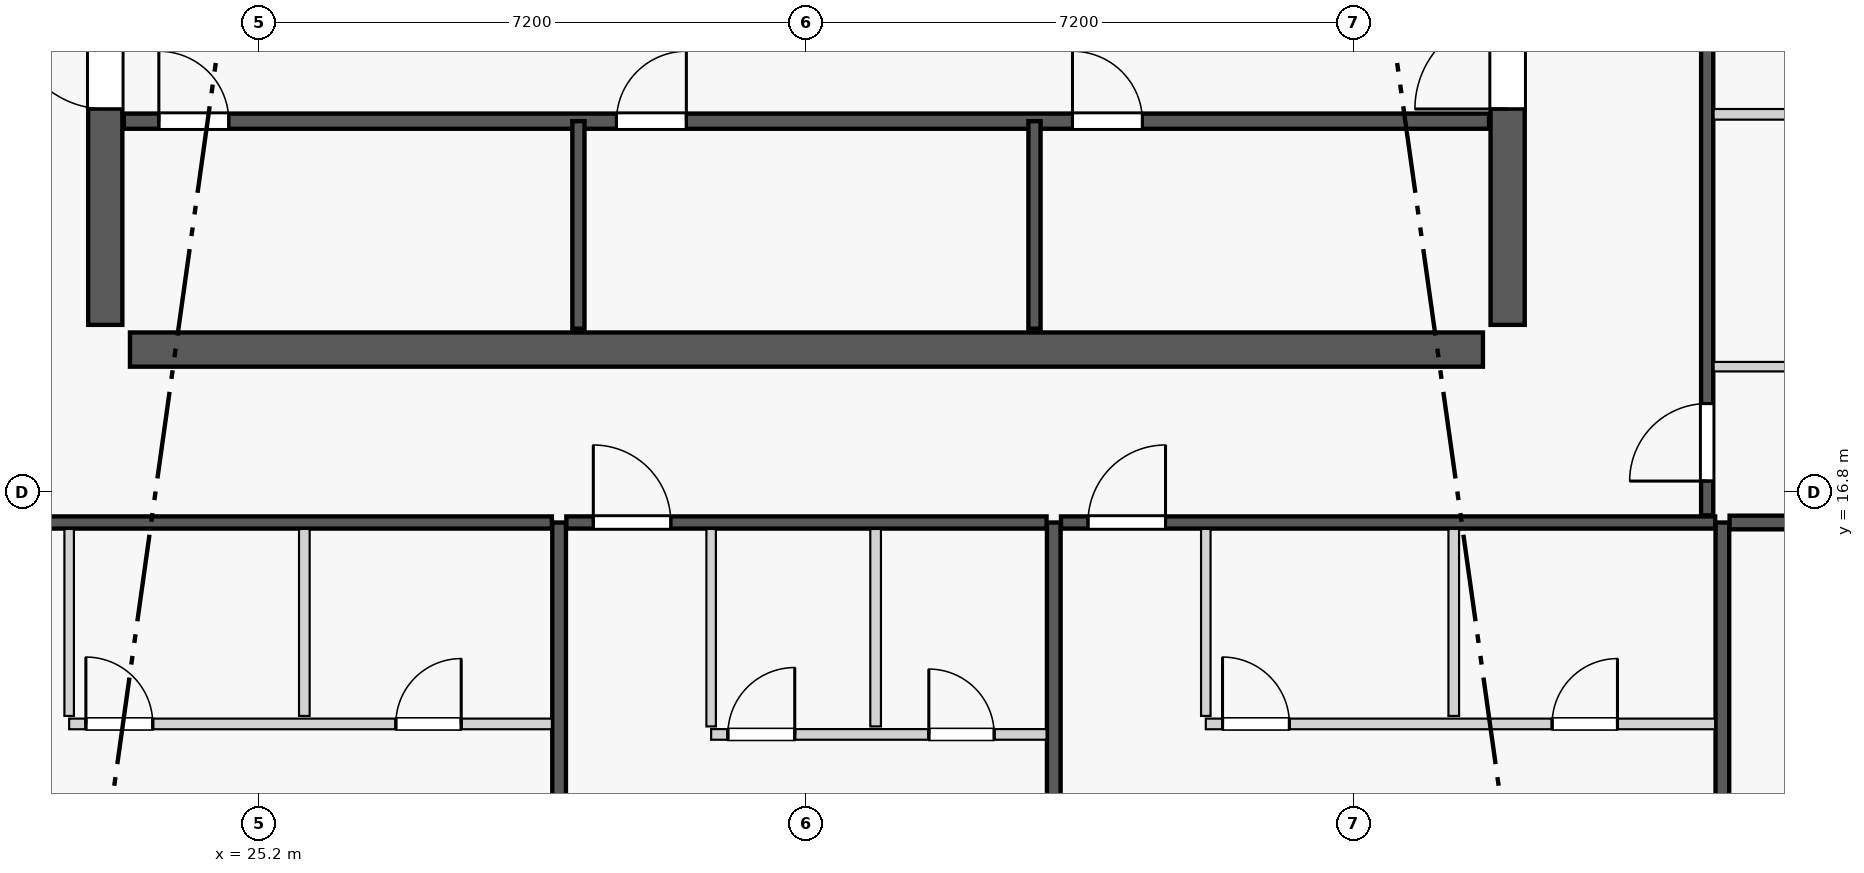
"""IFC4 building model, lengths in metres.
Left out: names, types, materials, properties, quantities, classifications, styles, units other than length and angle.
Written with IfcOpenShell. Run it as: python <this file> out.ifc"""

import sys

from ifc_helpers import new_model, si_unit, direction, frame, frame_2d, origin, origin_2d, place, context, subcontext, project, spatial, rectangle, extrude, element, fill, save


model = new_model("IFC4")
c1 = context("Model", 3, precision=1e-05, world=origin(), true_north=direction((0.0, 1.0)))
c2 = subcontext(c1, "Body", "Model", "MODEL_VIEW")
j1 = project(units=[si_unit("LENGTHUNIT", "METRE"), si_unit("PLANEANGLEUNIT", "RADIAN")], contexts=[c1])
p1 = place(None, origin())
s1 = spatial("IfcSite", under=j1, at=p1, CompositionType="ELEMENT")
p2 = place(p1, origin())
s2 = spatial("IfcBuilding", under=s1, at=p2, CompositionType="ELEMENT")
p3 = place(p2, frame((0.0, 0.0, 241.6)))
s3 = spatial("IfcBuildingStorey", under=s2, at=p3, CompositionType="ELEMENT", Elevation=241.6)
for number, where, z_axis, x_axis in (
    (1, (23.175, 18.675, 0.0), (0.0, 0.0, 1.0), (1.0, 0.0, 0.0)),
    (2, (41.625, 18.675, 0.0), (0.0, 0.0, 1.0), (1.0, 0.0, 0.0)),
):
    element("IfcColumn", number, at=place(p3, frame(where, z_axis=z_axis, x_axis=x_axis)), inside=s3, PredefinedType="COLUMN", context=c2, shape_type="SweptSolid", body=[
        extrude(rectangle(XDim=0.65, YDim=0.65, at=origin_2d()), origin(), (0.0, 0.0, 1.0), 3.65),
    ])
p4 = place(p3, frame((23.5, 18.675, 0.0), z_axis=(0.0, 0.0, 1.0), x_axis=(1.0, 0.0, 0.0)))
e3 = element("IfcWall", 3, at=p4, inside=s3, PredefinedType="SHEAR", context=c2, shape_type="SweptSolid", body=[
    extrude(rectangle(XDim=17.8, YDim=0.45, at=frame_2d((8.9, 0.0))), origin(), (0.0, 0.0, 1.0), 3.45),
])
p5 = place(p3, frame((23.175, 19.0, 0.0), z_axis=(0.0, 0.0, 1.0), x_axis=(0.0, 1.0, 0.0)))
e4 = element("IfcWall", 4, at=p5, inside=s3, PredefinedType="SHEAR", context=c2, shape_type="SweptSolid", body=[
    extrude(rectangle(XDim=13.8, YDim=0.45, at=frame_2d((6.9, 0.0))), origin(), (0.0, 0.0, 1.0), 3.45),
])
p6 = place(p5, frame((2.84, 0.0, 0.0)))
e5 = element("IfcOpeningElement", 5, at=p6, cuts=e4, PredefinedType="OPENING", context=c2, shape_type="SweptSolid", body=[
    extrude(rectangle(XDim=1.22, YDim=2.25, at=frame_2d((0.61, 1.125))), frame((0.0, 0.235, 0.0), z_axis=(0.0, -1.0, 0.0), x_axis=(1.0, 0.0, 0.0)), (0.0, 0.0, 1.0), 0.47),
])
p7 = place(p3, frame((41.625, 19.0, 0.0), z_axis=(0.0, 0.0, 1.0), x_axis=(0.0, 1.0, 0.0)))
e6 = element("IfcWall", 6, at=p7, inside=s3, PredefinedType="SHEAR", context=c2, shape_type="SweptSolid", body=[
    extrude(rectangle(XDim=13.8, YDim=0.45, at=frame_2d((6.9, 0.0))), origin(), (0.0, 0.0, 1.0), 3.45),
])
p8 = place(p7, frame((2.84, 0.0, 0.0)))
e7 = element("IfcOpeningElement", 7, at=p8, cuts=e6, PredefinedType="OPENING", context=c2, shape_type="SweptSolid", body=[
    extrude(rectangle(XDim=1.22, YDim=2.25, at=frame_2d((0.61, 1.125))), frame((0.0, 0.235, 0.0), z_axis=(0.0, -1.0, 0.0), x_axis=(1.0, 0.0, 0.0)), (0.0, 0.0, 1.0), 0.47),
])
p9 = place(p3, frame((23.42, 21.68, 0.0), z_axis=(0.0, 0.0, 1.0), x_axis=(1.0, 0.0, 0.0)))
e8 = element("IfcWall", 8, at=p9, inside=s3, PredefinedType="PLUMBINGWALL", context=c2, shape_type="SweptSolid", body=[
    extrude(rectangle(XDim=17.96, YDim=0.2, at=frame_2d((8.98, 0.0))), origin(), (0.0, 0.0, 1.0), 3.45),
])
p10 = place(p9, frame((0.46, 0.0, 0.0)))
e9 = element("IfcOpeningElement", 9, at=p10, cuts=e8, PredefinedType="OPENING", context=c2, shape_type="SweptSolid", body=[
    extrude(rectangle(XDim=0.92, YDim=2.15, at=frame_2d((0.46, 1.075))), frame((0.0, 0.11, 0.0), z_axis=(0.0, -1.0, 0.0), x_axis=(1.0, 0.0, 0.0)), (0.0, 0.0, 1.0), 0.22),
])
p11 = place(p9, frame((6.48, 0.0, 0.0)))
e10 = element("IfcOpeningElement", 10, at=p11, cuts=e8, PredefinedType="OPENING", context=c2, shape_type="SweptSolid", body=[
    extrude(rectangle(XDim=0.92, YDim=2.15, at=frame_2d((0.46, 1.075))), frame((0.0, 0.11, 0.0), z_axis=(0.0, -1.0, 0.0), x_axis=(1.0, 0.0, 0.0)), (0.0, 0.0, 1.0), 0.22),
])
p12 = place(p9, frame((12.48, 0.0, 0.0)))
e11 = element("IfcOpeningElement", 11, at=p12, cuts=e8, PredefinedType="OPENING", context=c2, shape_type="SweptSolid", body=[
    extrude(rectangle(XDim=0.92, YDim=2.15, at=frame_2d((0.46, 1.075))), frame((0.0, 0.11, 0.0), z_axis=(0.0, -1.0, 0.0), x_axis=(1.0, 0.0, 0.0)), (0.0, 0.0, 1.0), 0.22),
])
for number, where, z_axis, x_axis in (
    (12, (29.4, 18.95, 0.0), (0.0, 0.0, 1.0), (0.0, 1.0, 0.0)),
    (13, (35.4, 18.95, 0.0), (0.0, 0.0, 1.0), (0.0, 1.0, 0.0)),
):
    element("IfcWall", number, at=place(p3, frame(where, z_axis=z_axis, x_axis=x_axis)), inside=s3, PredefinedType="PARTITIONING", context=c2, shape_type="SweptSolid", body=[
        extrude(rectangle(XDim=2.73, YDim=0.16, at=frame_2d((1.365, 0.0))), origin(), (0.0, 0.0, 1.0), 3.45),
    ])
for number, where, z_axis, x_axis in (
    (14, (29.146, 7.405, 0.0), (0.0, 0.0, 1.0), (0.0, 1.0, 0.0)),
    (15, (35.654, 7.405, 0.0), (0.0, 0.0, 1.0), (0.0, 1.0, 0.0)),
):
    element("IfcWall", number, at=place(p3, frame(where, z_axis=z_axis, x_axis=x_axis)), inside=s3, PredefinedType="PARTITIONING", context=c2, shape_type="SweptSolid", body=[
        extrude(rectangle(XDim=8.995, YDim=0.18, at=frame_2d((4.498, 0.0))), origin(), (0.0, 0.0, 1.0), 2.907),
    ])
p13 = place(p3, frame((44.45, 8.119, 0.0), z_axis=(0.0, 0.0, 1.0), x_axis=(0.0, 1.0, 0.0)))
e16 = element("IfcWall", 16, at=p13, inside=s3, PredefinedType="PARTITIONING", context=c2, shape_type="SweptSolid", body=[
    extrude(rectangle(XDim=8.281, YDim=0.18, at=frame_2d((4.141, 0.0))), origin(), (0.0, 0.0, 1.0), 3.45),
])
p14 = place(p3, frame((20.445, 16.4, 0.0), z_axis=(0.0, 0.0, 1.0), x_axis=(1.0, 0.0, 0.0)))
e17 = element("IfcWall", 17, at=p14, inside=s3, PredefinedType="PARTITIONING", context=c2, shape_type="SweptSolid", body=[
    extrude(rectangle(XDim=8.606, YDim=0.16, at=frame_2d((4.303, 0.0))), origin(), (0.0, 0.0, 1.0), 3.45),
])
p15 = place(p14, frame((0.705, 0.0, 0.0)))
e18 = element("IfcOpeningElement", 18, at=p15, cuts=e17, PredefinedType="OPENING", context=c2, shape_type="SweptSolid", body=[
    extrude(rectangle(XDim=1.02, YDim=2.25, at=frame_2d((0.51, 1.125))), frame((0.0, 0.09, 0.0), z_axis=(0.0, -1.0, 0.0), x_axis=(1.0, 0.0, 0.0)), (0.0, 0.0, 1.0), 0.18),
])
p16 = place(p3, frame((22.7, 13.855, 0.0), z_axis=(0.0, 0.0, 1.0), x_axis=(0.0, 1.0, 0.0)))
e19 = element("IfcWall", 19, at=p16, inside=s3, PredefinedType="PARTITIONING", context=c2, shape_type="SweptSolid", body=[
    extrude(rectangle(XDim=2.46, YDim=0.125, at=frame_2d((1.23, 0.0))), origin(), (0.0, 0.0, 1.0), 2.907),
])
p17 = place(p3, frame((22.7, 13.75, 0.0), z_axis=(0.0, 0.0, 1.0), x_axis=(1.0, 0.0, 0.0)))
e20 = element("IfcWall", 20, at=p17, inside=s3, PredefinedType="PLUMBINGWALL", context=c2, shape_type="SweptSolid", body=[
    extrude(rectangle(XDim=6.351, YDim=0.14, at=frame_2d((3.176, 0.0))), origin(), (0.0, 0.0, 1.0), 3.45),
])
p18 = place(p17, frame((4.298, 0.0, 0.0)))
e21 = element("IfcOpeningElement", 21, at=p18, cuts=e20, PredefinedType="OPENING", context=c2, shape_type="SweptSolid", body=[
    extrude(rectangle(XDim=0.86, YDim=2.1, at=frame_2d((0.43, 1.05))), frame((0.0, 0.08, 0.0), z_axis=(0.0, -1.0, 0.0), x_axis=(1.0, 0.0, 0.0)), (0.0, 0.0, 1.0), 0.16),
])
p19 = place(p17, frame((0.22, 0.0, 0.0)))
e22 = element("IfcOpeningElement", 22, at=p19, cuts=e20, PredefinedType="OPENING", context=c2, shape_type="SweptSolid", body=[
    extrude(rectangle(XDim=0.88, YDim=2.15, at=frame_2d((0.44, 1.075))), frame((0.0, 0.08, 0.0), z_axis=(0.0, -1.0, 0.0), x_axis=(1.0, 0.0, 0.0)), (0.0, 0.0, 1.0), 0.16),
])
p20 = place(p3, frame((25.794, 13.855, 0.0), z_axis=(0.0, 0.0, 1.0), x_axis=(0.0, 1.0, 0.0)))
e23 = element("IfcWall", 23, at=p20, inside=s3, PredefinedType="PLUMBINGWALL", context=c2, shape_type="SweptSolid", body=[
    extrude(rectangle(XDim=2.46, YDim=0.14, at=frame_2d((1.23, 0.0))), origin(), (0.0, 0.0, 1.0), 3.45),
])
p21 = place(p3, frame((29.241, 16.4, 0.0), z_axis=(0.0, 0.0, 1.0), x_axis=(1.0, 0.0, 0.0)))
e24 = element("IfcWall", 24, at=p21, inside=s3, PredefinedType="PARTITIONING", context=c2, shape_type="SweptSolid", body=[
    extrude(rectangle(XDim=6.318, YDim=0.16, at=frame_2d((3.159, 0.0))), origin(), (0.0, 0.0, 1.0), 3.45),
])
p22 = place(p21, frame((0.355, 0.0, 0.0)))
e25 = element("IfcOpeningElement", 25, at=p22, cuts=e24, PredefinedType="OPENING", context=c2, shape_type="SweptSolid", body=[
    extrude(rectangle(XDim=1.02, YDim=2.25, at=frame_2d((0.51, 1.125))), frame((0.0, 0.09, 0.0), z_axis=(0.0, -1.0, 0.0), x_axis=(1.0, 0.0, 0.0)), (0.0, 0.0, 1.0), 0.18),
])
p23 = place(p3, frame((31.146, 13.717, 0.0), z_axis=(0.0, 0.0, 1.0), x_axis=(0.0, 1.0, 0.0)))
e26 = element("IfcWall", 26, at=p23, inside=s3, PredefinedType="PARTITIONING", context=c2, shape_type="SweptSolid", body=[
    extrude(rectangle(XDim=2.598, YDim=0.125, at=frame_2d((1.299, 0.0))), origin(), (0.0, 0.0, 1.0), 3.45),
])
p24 = place(p3, frame((31.146, 13.612, 0.0), z_axis=(0.0, 0.0, 1.0), x_axis=(1.0, 0.0, 0.0)))
e27 = element("IfcWall", 27, at=p24, inside=s3, PredefinedType="PLUMBINGWALL", context=c2, shape_type="SweptSolid", body=[
    extrude(rectangle(XDim=4.413, YDim=0.14, at=frame_2d((2.207, 0.0))), origin(), (0.0, 0.0, 1.0), 3.45),
])
p25 = place(p24, frame((2.864, 0.0, 0.0)))
e28 = element("IfcOpeningElement", 28, at=p25, cuts=e27, PredefinedType="OPENING", context=c2, shape_type="SweptSolid", body=[
    extrude(rectangle(XDim=0.86, YDim=2.1, at=frame_2d((0.43, 1.05))), frame((0.0, 0.08, 0.0), z_axis=(0.0, -1.0, 0.0), x_axis=(1.0, 0.0, 0.0)), (0.0, 0.0, 1.0), 0.16),
])
p26 = place(p24, frame((0.22, 0.0, 0.0)))
e29 = element("IfcOpeningElement", 29, at=p26, cuts=e27, PredefinedType="OPENING", context=c2, shape_type="SweptSolid", body=[
    extrude(rectangle(XDim=0.88, YDim=2.15, at=frame_2d((0.44, 1.075))), frame((0.0, 0.08, 0.0), z_axis=(0.0, -1.0, 0.0), x_axis=(1.0, 0.0, 0.0)), (0.0, 0.0, 1.0), 0.16),
])
p27 = place(p3, frame((33.31, 13.717, 0.0), z_axis=(0.0, 0.0, 1.0), x_axis=(0.0, 1.0, 0.0)))
e30 = element("IfcWall", 30, at=p27, inside=s3, PredefinedType="PLUMBINGWALL", context=c2, shape_type="SweptSolid", body=[
    extrude(rectangle(XDim=2.598, YDim=0.14, at=frame_2d((1.299, 0.0))), origin(), (0.0, 0.0, 1.0), 3.45),
])
p28 = place(p3, frame((35.749, 16.4, 0.0), z_axis=(0.0, 0.0, 1.0), x_axis=(1.0, 0.0, 0.0)))
e31 = element("IfcWall", 31, at=p28, inside=s3, PredefinedType="PARTITIONING", context=c2, shape_type="SweptSolid", body=[
    extrude(rectangle(XDim=8.606, YDim=0.16, at=frame_2d((4.303, 0.0))), origin(), (0.0, 0.0, 1.0), 3.45),
])
p29 = place(p28, frame((0.355, 0.0, 0.0)))
e32 = element("IfcOpeningElement", 32, at=p29, cuts=e31, PredefinedType="OPENING", context=c2, shape_type="SweptSolid", body=[
    extrude(rectangle(XDim=1.02, YDim=2.25, at=frame_2d((0.51, 1.125))), frame((0.0, 0.09, 0.0), z_axis=(0.0, -1.0, 0.0), x_axis=(1.0, 0.0, 0.0)), (0.0, 0.0, 1.0), 0.18),
])
p30 = place(p3, frame((37.654, 13.855, 0.0), z_axis=(0.0, 0.0, 1.0), x_axis=(0.0, 1.0, 0.0)))
e33 = element("IfcWall", 33, at=p30, inside=s3, PredefinedType="PARTITIONING", context=c2, shape_type="SweptSolid", body=[
    extrude(rectangle(XDim=2.46, YDim=0.125, at=frame_2d((1.23, 0.0))), origin(), (0.0, 0.0, 1.0), 3.45),
])
p31 = place(p3, frame((37.654, 13.75, 0.0), z_axis=(0.0, 0.0, 1.0), x_axis=(1.0, 0.0, 0.0)))
e34 = element("IfcWall", 34, at=p31, inside=s3, PredefinedType="PLUMBINGWALL", context=c2, shape_type="SweptSolid", body=[
    extrude(rectangle(XDim=6.701, YDim=0.14, at=frame_2d((3.351, 0.0))), origin(), (0.0, 0.0, 1.0), 3.45),
])
p32 = place(p31, frame((4.556, 0.0, 0.0)))
e35 = element("IfcOpeningElement", 35, at=p32, cuts=e34, PredefinedType="OPENING", context=c2, shape_type="SweptSolid", body=[
    extrude(rectangle(XDim=0.86, YDim=2.1, at=frame_2d((0.43, 1.05))), frame((0.0, 0.08, 0.0), z_axis=(0.0, -1.0, 0.0), x_axis=(1.0, 0.0, 0.0)), (0.0, 0.0, 1.0), 0.16),
])
p33 = place(p31, frame((0.22, 0.0, 0.0)))
e36 = element("IfcOpeningElement", 36, at=p33, cuts=e34, PredefinedType="OPENING", context=c2, shape_type="SweptSolid", body=[
    extrude(rectangle(XDim=0.88, YDim=2.15, at=frame_2d((0.44, 1.075))), frame((0.0, 0.08, 0.0), z_axis=(0.0, -1.0, 0.0), x_axis=(1.0, 0.0, 0.0)), (0.0, 0.0, 1.0), 0.16),
])
p34 = place(p3, frame((40.916, 13.855, 0.0), z_axis=(0.0, 0.0, 1.0), x_axis=(0.0, 1.0, 0.0)))
e37 = element("IfcWall", 37, at=p34, inside=s3, PredefinedType="PLUMBINGWALL", context=c2, shape_type="SweptSolid", body=[
    extrude(rectangle(XDim=2.46, YDim=0.14, at=frame_2d((1.23, 0.0))), origin(), (0.0, 0.0, 1.0), 3.45),
])
p35 = place(p3, frame((44.545, 16.4, 0.0), z_axis=(0.0, 0.0, 1.0), x_axis=(1.0, 0.0, 0.0)))
e38 = element("IfcWall", 38, at=p35, inside=s3, PredefinedType="PARTITIONING", context=c2, shape_type="SweptSolid", body=[
    extrude(rectangle(XDim=4.221, YDim=0.18, at=frame_2d((2.111, 0.0))), origin(), (0.0, 0.0, 1.0), 3.45),
])
p36 = place(p3, frame((44.25, 16.495, 0.0), z_axis=(0.0, 0.0, 1.0), x_axis=(0.0, 1.0, 0.0)))
e39 = element("IfcWall", 39, at=p36, inside=s3, PredefinedType="PARTITIONING", context=c2, shape_type="SweptSolid", body=[
    extrude(rectangle(XDim=18.41, YDim=0.16, at=frame_2d((9.205, 0.0))), origin(), (0.0, 0.0, 1.0), 3.137),
])
p37 = place(p36, frame((0.45, 0.0, 0.0)))
e40 = element("IfcOpeningElement", 40, at=p37, cuts=e39, PredefinedType="OPENING", context=c2, shape_type="SweptSolid", body=[
    extrude(rectangle(XDim=1.02, YDim=2.25, at=frame_2d((0.51, 1.125))), frame((0.0, 0.09, 0.0), z_axis=(0.0, -1.0, 0.0), x_axis=(1.0, 0.0, 0.0)), (0.0, 0.0, 1.0), 0.18),
])
p38 = place(p3, frame((44.335, 18.45, 0.0), z_axis=(0.0, 0.0, 1.0), x_axis=(1.0, 0.0, 0.0)))
e41 = element("IfcWall", 41, at=p38, inside=s3, PredefinedType="PARTITIONING", context=c2, shape_type="SweptSolid", body=[
    extrude(rectangle(XDim=3.78, YDim=0.125, at=frame_2d((1.89, 0.0))), origin(), (0.0, 0.0, 1.0), 3.45),
])
p39 = place(p3, frame((44.335, 21.77, 0.0), z_axis=(0.0, 0.0, 1.0), x_axis=(1.0, 0.0, 0.0)))
e42 = element("IfcWall", 42, at=p39, inside=s3, PredefinedType="PLUMBINGWALL", context=c2, shape_type="SweptSolid", body=[
    extrude(rectangle(XDim=3.78, YDim=0.14, at=frame_2d((1.89, 0.0))), origin(), (0.0, 0.0, 1.0), 3.45),
])
p40 = place(p6, origin())
e43 = element("IfcDoor", 43, at=p40, inside=s3, OperationType="SINGLE_SWING_RIGHT", PredefinedType="DOOR", context=c2, shape_type="SweptSolid", body=[
    extrude(rectangle(XDim=1.22, YDim=2.25, at=frame_2d((0.61, 1.125))), frame((0.0, 0.025, 0.0), z_axis=(0.0, -1.0, 0.0), x_axis=(1.0, 0.0, 0.0)), (0.0, 0.0, 1.0), 0.05),
])
fill(e5, e43)
p41 = place(p8, origin())
e44 = element("IfcDoor", 44, at=p41, inside=s3, OperationType="SINGLE_SWING_LEFT", PredefinedType="DOOR", context=c2, shape_type="SweptSolid", body=[
    extrude(rectangle(XDim=1.22, YDim=2.25, at=frame_2d((0.61, 1.125))), frame((0.0, 0.025, 0.0), z_axis=(0.0, -1.0, 0.0), x_axis=(1.0, 0.0, 0.0)), (0.0, 0.0, 1.0), 0.05),
])
fill(e7, e44)
p42 = place(p10, origin())
e45 = element("IfcDoor", 45, at=p42, inside=s3, OperationType="SINGLE_SWING_LEFT", PredefinedType="DOOR", context=c2, shape_type="SweptSolid", body=[
    extrude(rectangle(XDim=0.92, YDim=2.15, at=frame_2d((0.46, 1.075))), frame((0.0, 0.025, 0.0), z_axis=(0.0, -1.0, 0.0), x_axis=(1.0, 0.0, 0.0)), (0.0, 0.0, 1.0), 0.05),
])
fill(e9, e45)
p43 = place(p11, origin())
e46 = element("IfcDoor", 46, at=p43, inside=s3, OperationType="SINGLE_SWING_RIGHT", PredefinedType="DOOR", context=c2, shape_type="SweptSolid", body=[
    extrude(rectangle(XDim=0.92, YDim=2.15, at=frame_2d((0.46, 1.075))), frame((0.0, 0.025, 0.0), z_axis=(0.0, -1.0, 0.0), x_axis=(1.0, 0.0, 0.0)), (0.0, 0.0, 1.0), 0.05),
])
fill(e10, e46)
p44 = place(p12, origin())
e47 = element("IfcDoor", 47, at=p44, inside=s3, OperationType="SINGLE_SWING_LEFT", PredefinedType="DOOR", context=c2, shape_type="SweptSolid", body=[
    extrude(rectangle(XDim=0.92, YDim=2.15, at=frame_2d((0.46, 1.075))), frame((0.0, 0.025, 0.0), z_axis=(0.0, -1.0, 0.0), x_axis=(1.0, 0.0, 0.0)), (0.0, 0.0, 1.0), 0.05),
])
fill(e11, e47)
p45 = place(p18, origin())
e48 = element("IfcDoor", 48, at=p45, inside=s3, OperationType="SINGLE_SWING_RIGHT", PredefinedType="DOOR", context=c2, shape_type="SweptSolid", body=[
    extrude(rectangle(XDim=0.86, YDim=2.1, at=frame_2d((0.43, 1.05))), frame((0.0, 0.025, 0.0), z_axis=(0.0, -1.0, 0.0), x_axis=(1.0, 0.0, 0.0)), (0.0, 0.0, 1.0), 0.05),
])
fill(e21, e48)
p46 = place(p19, origin())
e49 = element("IfcDoor", 49, at=p46, inside=s3, OperationType="SINGLE_SWING_LEFT", PredefinedType="DOOR", context=c2, shape_type="SweptSolid", body=[
    extrude(rectangle(XDim=0.88, YDim=2.15, at=frame_2d((0.44, 1.075))), frame((0.0, 0.025, 0.0), z_axis=(0.0, -1.0, 0.0), x_axis=(1.0, 0.0, 0.0)), (0.0, 0.0, 1.0), 0.05),
])
fill(e22, e49)
p47 = place(p25, origin())
e50 = element("IfcDoor", 50, at=p47, inside=s3, OperationType="SINGLE_SWING_LEFT", PredefinedType="DOOR", context=c2, shape_type="SweptSolid", body=[
    extrude(rectangle(XDim=0.86, YDim=2.1, at=frame_2d((0.43, 1.05))), frame((0.0, 0.025, 0.0), z_axis=(0.0, -1.0, 0.0), x_axis=(1.0, 0.0, 0.0)), (0.0, 0.0, 1.0), 0.05),
])
fill(e28, e50)
p48 = place(p22, origin())
e51 = element("IfcDoor", 51, at=p48, inside=s3, OperationType="SINGLE_SWING_LEFT", PredefinedType="DOOR", context=c2, shape_type="SweptSolid", body=[
    extrude(rectangle(XDim=1.02, YDim=2.25, at=frame_2d((0.51, 1.125))), frame((0.0, 0.025, 0.0), z_axis=(0.0, -1.0, 0.0), x_axis=(1.0, 0.0, 0.0)), (0.0, 0.0, 1.0), 0.05),
])
fill(e25, e51)
p49 = place(p26, origin())
e52 = element("IfcDoor", 52, at=p49, inside=s3, OperationType="SINGLE_SWING_RIGHT", PredefinedType="DOOR", context=c2, shape_type="SweptSolid", body=[
    extrude(rectangle(XDim=0.88, YDim=2.15, at=frame_2d((0.44, 1.075))), frame((0.0, 0.025, 0.0), z_axis=(0.0, -1.0, 0.0), x_axis=(1.0, 0.0, 0.0)), (0.0, 0.0, 1.0), 0.05),
])
fill(e29, e52)
p50 = place(p32, origin())
e53 = element("IfcDoor", 53, at=p50, inside=s3, OperationType="SINGLE_SWING_RIGHT", PredefinedType="DOOR", context=c2, shape_type="SweptSolid", body=[
    extrude(rectangle(XDim=0.86, YDim=2.1, at=frame_2d((0.43, 1.05))), frame((0.0, 0.025, 0.0), z_axis=(0.0, -1.0, 0.0), x_axis=(1.0, 0.0, 0.0)), (0.0, 0.0, 1.0), 0.05),
])
fill(e35, e53)
p51 = place(p29, origin())
e54 = element("IfcDoor", 54, at=p51, inside=s3, OperationType="SINGLE_SWING_RIGHT", PredefinedType="DOOR", context=c2, shape_type="SweptSolid", body=[
    extrude(rectangle(XDim=1.02, YDim=2.25, at=frame_2d((0.51, 1.125))), frame((0.0, 0.025, 0.0), z_axis=(0.0, -1.0, 0.0), x_axis=(1.0, 0.0, 0.0)), (0.0, 0.0, 1.0), 0.05),
])
fill(e32, e54)
p52 = place(p33, origin())
e55 = element("IfcDoor", 55, at=p52, inside=s3, OperationType="SINGLE_SWING_LEFT", PredefinedType="DOOR", context=c2, shape_type="SweptSolid", body=[
    extrude(rectangle(XDim=0.88, YDim=2.15, at=frame_2d((0.44, 1.075))), frame((0.0, 0.025, 0.0), z_axis=(0.0, -1.0, 0.0), x_axis=(1.0, 0.0, 0.0)), (0.0, 0.0, 1.0), 0.05),
])
fill(e36, e55)
p53 = place(p37, origin())
e56 = element("IfcDoor", 56, at=p53, inside=s3, OperationType="SINGLE_SWING_LEFT", PredefinedType="DOOR", context=c2, shape_type="SweptSolid", body=[
    extrude(rectangle(XDim=1.02, YDim=2.25, at=frame_2d((0.51, 1.125))), frame((0.0, 0.025, 0.0), z_axis=(0.0, -1.0, 0.0), x_axis=(1.0, 0.0, 0.0)), (0.0, 0.0, 1.0), 0.05),
])
fill(e40, e56)
save(model, sys.argv[1])
